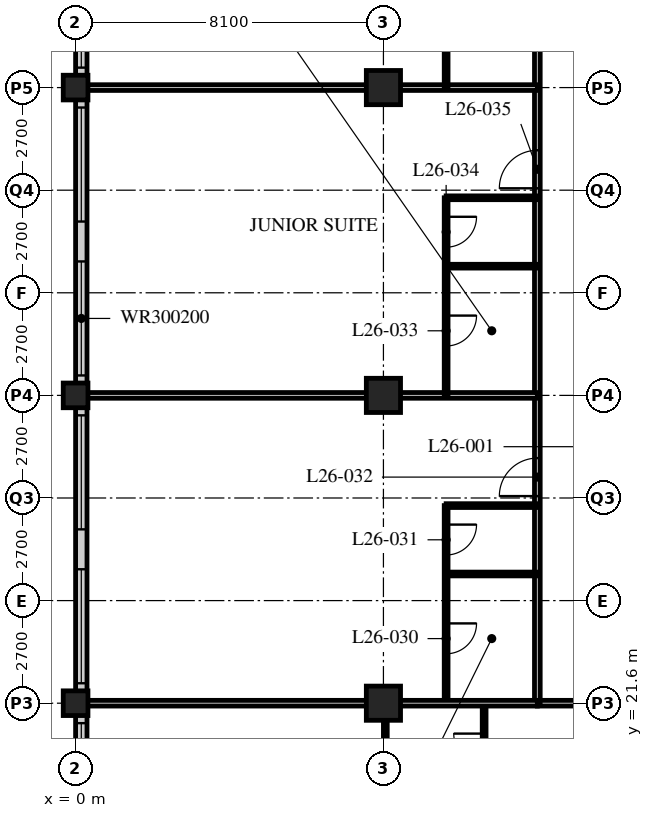
"""IFC4 building model, lengths in metres.
Left out: names, types, materials, properties, quantities, classifications, styles, units other than length and angle.
Written with IfcOpenShell. Run it as: python <this file> out.ifc"""

import sys

from ifc_helpers import new_model, si_unit, direction, frame, frame_2d, origin, origin_2d, place, context, subcontext, project, spatial, rectangle, hollow_rectangle, extrude, element, fill, save


model = new_model("IFC4")
c1 = context("Model", 3, precision=1e-05, world=origin(), true_north=direction((0.0, 1.0)))
c2 = subcontext(c1, "Body", "Model", "MODEL_VIEW")
j1 = project(units=[si_unit("LENGTHUNIT", "METRE"), si_unit("PLANEANGLEUNIT", "RADIAN")], contexts=[c1])
p1 = place(None, origin())
s1 = spatial("IfcSite", under=j1, at=p1, CompositionType="ELEMENT")
p2 = place(p1, origin())
s2 = spatial("IfcBuilding", under=s1, at=p2, CompositionType="ELEMENT")
p3 = place(p2, frame((0.0, 0.0, 106.8)))
s3 = spatial("IfcBuildingStorey", under=s2, at=p3, CompositionType="ELEMENT", Elevation=106.8)
for number, where, z_axis, x_axis in (
    (1, (0.0, 21.6, 0.0), (0.0, 0.0, 1.0), (1.0, 0.0, 0.0)),
    (2, (0.0, 29.7, 0.0), (0.0, 0.0, 1.0), (1.0, 0.0, 0.0)),
    (3, (0.0, 37.8, 0.0), (0.0, 0.0, 1.0), (1.0, 0.0, 0.0)),
):
    element("IfcColumn", number, at=place(p3, frame(where, z_axis=z_axis, x_axis=x_axis)), inside=s3, PredefinedType="COLUMN", context=c2, shape_type="SweptSolid", body=[
        extrude(hollow_rectangle(XDim=0.65, YDim=0.65, WallThickness=0.055, at=origin_2d()), origin(), (0.0, 0.0, 1.0), 3.4),
    ])
for number, where, z_axis, x_axis in (
    (4, (8.1, 21.6, 0.0), (0.0, 0.0, 1.0), (1.0, 0.0, 0.0)),
    (5, (8.1, 29.7, 0.0), (0.0, 0.0, 1.0), (1.0, 0.0, 0.0)),
    (6, (8.1, 37.8, 0.0), (0.0, 0.0, 1.0), (1.0, 0.0, 0.0)),
):
    element("IfcColumn", number, at=place(p3, frame(where, z_axis=z_axis, x_axis=x_axis)), inside=s3, PredefinedType="COLUMN", context=c2, shape_type="SweptSolid", body=[
        extrude(hollow_rectangle(XDim=0.9, YDim=0.9, WallThickness=0.09, at=origin_2d()), origin(), (0.0, 0.0, 1.0), 3.4),
    ])
p4 = place(p3, frame((0.15, 45.6, 0.0), z_axis=(0.0, 0.0, 1.0), x_axis=(0.0, -1.0, 0.0)))
e7 = element("IfcWall", 7, at=p4, inside=s3, PredefinedType="SOLIDWALL", context=c2, shape_type="SweptSolid", body=[
    extrude(rectangle(XDim=32.1, YDim=0.3, at=frame_2d((16.05, 0.0))), origin(), (0.0, 0.0, 1.0), 3.19),
])
p5 = place(p4, frame((0.225, 0.0, 0.9)))
e8 = element("IfcOpeningElement", 8, at=p5, cuts=e7, PredefinedType="OPENING", context=c2, shape_type="SweptSolid", body=[
    extrude(rectangle(XDim=3.0, YDim=2.0, at=frame_2d((1.5, 1.0))), frame((0.0, 0.16, 0.0), z_axis=(0.0, -1.0, 0.0), x_axis=(1.0, 0.0, 0.0)), (0.0, 0.0, 1.0), 0.32),
])
p6 = place(p4, frame((4.275, 0.0, 0.9)))
e9 = element("IfcOpeningElement", 9, at=p6, cuts=e7, PredefinedType="OPENING", context=c2, shape_type="SweptSolid", body=[
    extrude(rectangle(XDim=3.0, YDim=2.0, at=frame_2d((1.5, 1.0))), frame((0.0, 0.16, 0.0), z_axis=(0.0, -1.0, 0.0), x_axis=(1.0, 0.0, 0.0)), (0.0, 0.0, 1.0), 0.32),
])
p7 = place(p4, frame((8.325, 0.0, 0.9)))
e10 = element("IfcOpeningElement", 10, at=p7, cuts=e7, PredefinedType="OPENING", context=c2, shape_type="SweptSolid", body=[
    extrude(rectangle(XDim=3.0, YDim=2.0, at=frame_2d((1.5, 1.0))), frame((0.0, 0.16, 0.0), z_axis=(0.0, -1.0, 0.0), x_axis=(1.0, 0.0, 0.0)), (0.0, 0.0, 1.0), 0.32),
])
p8 = place(p4, frame((12.375, 0.0, 0.9)))
e11 = element("IfcOpeningElement", 11, at=p8, cuts=e7, PredefinedType="OPENING", context=c2, shape_type="SweptSolid", body=[
    extrude(rectangle(XDim=3.0, YDim=2.0, at=frame_2d((1.5, 1.0))), frame((0.0, 0.16, 0.0), z_axis=(0.0, -1.0, 0.0), x_axis=(1.0, 0.0, 0.0)), (0.0, 0.0, 1.0), 0.32),
])
p9 = place(p4, frame((16.425, 0.0, 0.9)))
e12 = element("IfcOpeningElement", 12, at=p9, cuts=e7, PredefinedType="OPENING", context=c2, shape_type="SweptSolid", body=[
    extrude(rectangle(XDim=3.0, YDim=2.0, at=frame_2d((1.5, 1.0))), frame((0.0, 0.16, 0.0), z_axis=(0.0, -1.0, 0.0), x_axis=(1.0, 0.0, 0.0)), (0.0, 0.0, 1.0), 0.32),
])
p10 = place(p4, frame((20.475, 0.0, 0.9)))
e13 = element("IfcOpeningElement", 13, at=p10, cuts=e7, PredefinedType="OPENING", context=c2, shape_type="SweptSolid", body=[
    extrude(rectangle(XDim=3.0, YDim=2.0, at=frame_2d((1.5, 1.0))), frame((0.0, 0.16, 0.0), z_axis=(0.0, -1.0, 0.0), x_axis=(1.0, 0.0, 0.0)), (0.0, 0.0, 1.0), 0.32),
])
p11 = place(p4, frame((24.525, 0.0, 0.9)))
e14 = element("IfcOpeningElement", 14, at=p11, cuts=e7, PredefinedType="OPENING", context=c2, shape_type="SweptSolid", body=[
    extrude(rectangle(XDim=3.0, YDim=2.0, at=frame_2d((1.5, 1.0))), frame((0.0, 0.16, 0.0), z_axis=(0.0, -1.0, 0.0), x_axis=(1.0, 0.0, 0.0)), (0.0, 0.0, 1.0), 0.32),
])
p12 = place(p4, frame((28.575, 0.0, 0.9)))
e15 = element("IfcOpeningElement", 15, at=p12, cuts=e7, PredefinedType="OPENING", context=c2, shape_type="SweptSolid", body=[
    extrude(rectangle(XDim=3.0, YDim=2.0, at=frame_2d((1.5, 1.0))), frame((0.0, 0.16, 0.0), z_axis=(0.0, -1.0, 0.0), x_axis=(1.0, 0.0, 0.0)), (0.0, 0.0, 1.0), 0.32),
])
p13 = place(p3, frame((12.15, 21.6, 0.0), z_axis=(0.0, 0.0, 1.0), x_axis=(1.0, 0.0, 0.0)))
e16 = element("IfcWall", 16, at=p13, inside=s3, PredefinedType="PARTITIONING", context=c2, shape_type="SweptSolid", body=[
    extrude(rectangle(XDim=32.4, YDim=0.15, at=frame_2d((16.2, 0.0))), origin(), (0.0, 0.0, 1.0), 2.578),
])
p14 = place(p13, frame((5.95, 0.0, 0.0)))
e17 = element("IfcOpeningElement", 17, at=p14, cuts=e16, PredefinedType="OPENING", context=c2, shape_type="SweptSolid", body=[
    extrude(rectangle(XDim=1.0, YDim=2.1, at=frame_2d((0.5, 1.05))), frame((0.0, 0.085, 0.0), z_axis=(0.0, -1.0, 0.0), x_axis=(1.0, 0.0, 0.0)), (0.0, 0.0, 1.0), 0.17),
])
p15 = place(p13, frame((14.05, 0.0, 0.0)))
e18 = element("IfcOpeningElement", 18, at=p15, cuts=e16, PredefinedType="OPENING", context=c2, shape_type="SweptSolid", body=[
    extrude(rectangle(XDim=1.0, YDim=2.1, at=frame_2d((0.5, 1.05))), frame((0.0, 0.085, 0.0), z_axis=(0.0, -1.0, 0.0), x_axis=(1.0, 0.0, 0.0)), (0.0, 0.0, 1.0), 0.17),
])
p16 = place(p13, frame((22.15, 0.0, 0.0)))
e19 = element("IfcOpeningElement", 19, at=p16, cuts=e16, PredefinedType="OPENING", context=c2, shape_type="SweptSolid", body=[
    extrude(rectangle(XDim=1.0, YDim=2.1, at=frame_2d((0.5, 1.05))), frame((0.0, 0.085, 0.0), z_axis=(0.0, -1.0, 0.0), x_axis=(1.0, 0.0, 0.0)), (0.0, 0.0, 1.0), 0.17),
])
p17 = place(p13, frame((1.525, 0.0, 0.0)))
e20 = element("IfcOpeningElement", 20, at=p17, cuts=e16, PredefinedType="OPENING", context=c2, shape_type="SweptSolid", body=[
    extrude(rectangle(XDim=1.0, YDim=2.1, at=frame_2d((0.5, 1.05))), frame((0.0, 0.085, 0.0), z_axis=(0.0, -1.0, 0.0), x_axis=(1.0, 0.0, 0.0)), (0.0, 0.0, 1.0), 0.17),
])
p18 = place(p13, frame((29.875, 0.0, 0.0)))
e21 = element("IfcOpeningElement", 21, at=p18, cuts=e16, PredefinedType="OPENING", context=c2, shape_type="SweptSolid", body=[
    extrude(rectangle(XDim=1.0, YDim=2.1, at=frame_2d((0.5, 1.05))), frame((0.0, 0.085, 0.0), z_axis=(0.0, -1.0, 0.0), x_axis=(1.0, 0.0, 0.0)), (0.0, 0.0, 1.0), 0.17),
])
p19 = place(p3, frame((12.15, 21.6, 0.0), z_axis=(0.0, 0.0, 1.0), x_axis=(0.0, 1.0, 0.0)))
e22 = element("IfcWall", 22, at=p19, inside=s3, PredefinedType="PARTITIONING", context=c2, shape_type="SweptSolid", body=[
    extrude(rectangle(XDim=24.3, YDim=0.15, at=frame_2d((12.15, 0.0))), origin(), (0.0, 0.0, 1.0), 3.19),
])
p20 = place(p19, frame((5.45, 0.0, 0.0)))
e23 = element("IfcOpeningElement", 23, at=p20, cuts=e22, PredefinedType="OPENING", context=c2, shape_type="SweptSolid", body=[
    extrude(rectangle(XDim=1.0, YDim=2.1, at=frame_2d((0.5, 1.05))), frame((0.0, 0.085, 0.0), z_axis=(0.0, -1.0, 0.0), x_axis=(1.0, 0.0, 0.0)), (0.0, 0.0, 1.0), 0.17),
])
p21 = place(p19, frame((13.55, 0.0, 0.0)))
e24 = element("IfcOpeningElement", 24, at=p21, cuts=e22, PredefinedType="OPENING", context=c2, shape_type="SweptSolid", body=[
    extrude(rectangle(XDim=1.0, YDim=2.1, at=frame_2d((0.5, 1.05))), frame((0.0, 0.085, 0.0), z_axis=(0.0, -1.0, 0.0), x_axis=(1.0, 0.0, 0.0)), (0.0, 0.0, 1.0), 0.17),
])
p22 = place(p19, frame((21.65, 0.0, 0.0)))
e25 = element("IfcOpeningElement", 25, at=p22, cuts=e22, PredefinedType="OPENING", context=c2, shape_type="SweptSolid", body=[
    extrude(rectangle(XDim=1.0, YDim=2.1, at=frame_2d((0.5, 1.05))), frame((0.0, 0.085, 0.0), z_axis=(0.0, -1.0, 0.0), x_axis=(1.0, 0.0, 0.0)), (0.0, 0.0, 1.0), 0.17),
])
p23 = place(p3, frame((9.75, 21.6, 0.0), z_axis=(0.0, 0.0, 1.0), x_axis=(0.0, 1.0, 0.0)))
e26 = element("IfcWall", 26, at=p23, inside=s3, PredefinedType="PARTITIONING", context=c2, shape_type="SweptSolid", body=[
    extrude(rectangle(XDim=5.2, YDim=0.1, at=frame_2d((2.6, 0.0))), origin(), (0.0, 0.0, 1.0), 3.19),
])
p24 = place(p23, frame((1.3, 0.0, 0.0)))
e27 = element("IfcOpeningElement", 27, at=p24, cuts=e26, PredefinedType="OPENING", context=c2, shape_type="SweptSolid", body=[
    extrude(rectangle(XDim=0.8, YDim=2.1, at=frame_2d((0.4, 1.05))), frame((0.0, 0.06, 0.0), z_axis=(0.0, -1.0, 0.0), x_axis=(1.0, 0.0, 0.0)), (0.0, 0.0, 1.0), 0.12),
])
p25 = place(p23, frame((3.9, 0.0, 0.0)))
e28 = element("IfcOpeningElement", 28, at=p25, cuts=e26, PredefinedType="OPENING", context=c2, shape_type="SweptSolid", body=[
    extrude(rectangle(XDim=0.8, YDim=2.1, at=frame_2d((0.4, 1.05))), frame((0.0, 0.06, 0.0), z_axis=(0.0, -1.0, 0.0), x_axis=(1.0, 0.0, 0.0)), (0.0, 0.0, 1.0), 0.12),
])
for number, where, z_axis, x_axis in (
    (29, (12.15, 25.0, 0.0), (0.0, 0.0, 1.0), (-1.0, 0.0, 0.0)),
    (30, (12.15, 26.8, 0.0), (0.0, 0.0, 1.0), (-1.0, 0.0, 0.0)),
):
    element("IfcWall", number, at=place(p3, frame(where, z_axis=z_axis, x_axis=x_axis)), inside=s3, PredefinedType="PARTITIONING", context=c2, shape_type="SweptSolid", body=[
        extrude(rectangle(XDim=2.4, YDim=0.1, at=frame_2d((1.2, 0.0))), origin(), (0.0, 0.0, 1.0), 3.19),
    ])
p26 = place(p3, frame((12.15, 29.7, 0.0), z_axis=(0.0, 0.0, 1.0), x_axis=(-1.0, 0.0, 0.0)))
e31 = element("IfcWall", 31, at=p26, inside=s3, PredefinedType="PARTITIONING", context=c2, shape_type="SweptSolid", body=[
    extrude(rectangle(XDim=11.85, YDim=0.15, at=frame_2d((5.925, 0.0))), origin(), (0.0, 0.0, 1.0), 2.578),
])
p27 = place(p3, frame((9.75, 29.7, 0.0), z_axis=(0.0, 0.0, 1.0), x_axis=(0.0, 1.0, 0.0)))
e32 = element("IfcWall", 32, at=p27, inside=s3, PredefinedType="PARTITIONING", context=c2, shape_type="SweptSolid", body=[
    extrude(rectangle(XDim=5.2, YDim=0.1, at=frame_2d((2.6, 0.0))), origin(), (0.0, 0.0, 1.0), 3.19),
])
p28 = place(p27, frame((1.3, 0.0, 0.0)))
e33 = element("IfcOpeningElement", 33, at=p28, cuts=e32, PredefinedType="OPENING", context=c2, shape_type="SweptSolid", body=[
    extrude(rectangle(XDim=0.8, YDim=2.1, at=frame_2d((0.4, 1.05))), frame((0.0, 0.06, 0.0), z_axis=(0.0, -1.0, 0.0), x_axis=(1.0, 0.0, 0.0)), (0.0, 0.0, 1.0), 0.12),
])
p29 = place(p27, frame((3.9, 0.0, 0.0)))
e34 = element("IfcOpeningElement", 34, at=p29, cuts=e32, PredefinedType="OPENING", context=c2, shape_type="SweptSolid", body=[
    extrude(rectangle(XDim=0.8, YDim=2.1, at=frame_2d((0.4, 1.05))), frame((0.0, 0.06, 0.0), z_axis=(0.0, -1.0, 0.0), x_axis=(1.0, 0.0, 0.0)), (0.0, 0.0, 1.0), 0.12),
])
for number, where, z_axis, x_axis in (
    (35, (12.15, 33.1, 0.0), (0.0, 0.0, 1.0), (-1.0, 0.0, 0.0)),
    (36, (12.15, 34.9, 0.0), (0.0, 0.0, 1.0), (-1.0, 0.0, 0.0)),
):
    element("IfcWall", number, at=place(p3, frame(where, z_axis=z_axis, x_axis=x_axis)), inside=s3, PredefinedType="PARTITIONING", context=c2, shape_type="SweptSolid", body=[
        extrude(rectangle(XDim=2.4, YDim=0.1, at=frame_2d((1.2, 0.0))), origin(), (0.0, 0.0, 1.0), 3.19),
    ])
p30 = place(p3, frame((12.15, 37.8, 0.0), z_axis=(0.0, 0.0, 1.0), x_axis=(-1.0, 0.0, 0.0)))
e37 = element("IfcWall", 37, at=p30, inside=s3, PredefinedType="PARTITIONING", context=c2, shape_type="SweptSolid", body=[
    extrude(rectangle(XDim=11.85, YDim=0.15, at=frame_2d((5.925, 0.0))), origin(), (0.0, 0.0, 1.0), 2.578),
])
p31 = place(p3, frame((9.75, 37.8, 0.0), z_axis=(0.0, 0.0, 1.0), x_axis=(0.0, 1.0, 0.0)))
e38 = element("IfcWall", 38, at=p31, inside=s3, PredefinedType="PARTITIONING", context=c2, shape_type="SweptSolid", body=[
    extrude(rectangle(XDim=5.2, YDim=0.1, at=frame_2d((2.6, 0.0))), origin(), (0.0, 0.0, 1.0), 3.19),
])
p32 = place(p31, frame((1.3, 0.0, 0.0)))
e39 = element("IfcOpeningElement", 39, at=p32, cuts=e38, PredefinedType="OPENING", context=c2, shape_type="SweptSolid", body=[
    extrude(rectangle(XDim=0.8, YDim=2.1, at=frame_2d((0.4, 1.05))), frame((0.0, 0.06, 0.0), z_axis=(0.0, -1.0, 0.0), x_axis=(1.0, 0.0, 0.0)), (0.0, 0.0, 1.0), 0.12),
])
p33 = place(p31, frame((3.9, 0.0, 0.0)))
e40 = element("IfcOpeningElement", 40, at=p33, cuts=e38, PredefinedType="OPENING", context=c2, shape_type="SweptSolid", body=[
    extrude(rectangle(XDim=0.8, YDim=2.1, at=frame_2d((0.4, 1.05))), frame((0.0, 0.06, 0.0), z_axis=(0.0, -1.0, 0.0), x_axis=(1.0, 0.0, 0.0)), (0.0, 0.0, 1.0), 0.12),
])
p34 = place(p3, frame((10.75, 21.6, 0.0), z_axis=(0.0, 0.0, 1.0), x_axis=(0.0, -1.0, 0.0)))
e41 = element("IfcWall", 41, at=p34, inside=s3, PredefinedType="PARTITIONING", context=c2, shape_type="SweptSolid", body=[
    extrude(rectangle(XDim=2.4, YDim=0.1, at=frame_2d((1.2, 0.0))), origin(), (0.0, 0.0, 1.0), 3.19),
])
p35 = place(p34, frame((0.8, 0.0, 0.0)))
e42 = element("IfcOpeningElement", 42, at=p35, cuts=e41, PredefinedType="OPENING", context=c2, shape_type="SweptSolid", body=[
    extrude(rectangle(XDim=0.8, YDim=2.1, at=frame_2d((0.4, 1.05))), frame((0.0, 0.06, 0.0), z_axis=(0.0, -1.0, 0.0), x_axis=(1.0, 0.0, 0.0)), (0.0, 0.0, 1.0), 0.12),
])
p36 = place(p3, frame((8.15, 21.6, 0.0), z_axis=(0.0, 0.0, 1.0), x_axis=(0.0, -1.0, 0.0)))
e43 = element("IfcWall", 43, at=p36, inside=s3, PredefinedType="PARTITIONING", context=c2, shape_type="SweptSolid", body=[
    extrude(rectangle(XDim=2.4, YDim=0.1, at=frame_2d((1.2, 0.0))), origin(), (0.0, 0.0, 1.0), 2.578),
])
p37 = place(p3, frame((0.3, 21.6, 0.0), z_axis=(0.0, 0.0, 1.0), x_axis=(1.0, 0.0, 0.0)))
e44 = element("IfcWall", 44, at=p37, inside=s3, PredefinedType="PARTITIONING", context=c2, shape_type="SweptSolid", body=[
    extrude(rectangle(XDim=11.85, YDim=0.15, at=frame_2d((5.925, 0.0))), origin(), (0.0, 0.0, 1.0), 2.578),
])
p38 = place(p6, origin())
e45 = element("IfcWindow", 45, at=p38, inside=s3, PartitioningType="SINGLE_PANEL", PredefinedType="WINDOW", context=c2, shape_type="SweptSolid", body=[
    extrude(rectangle(XDim=3.0, YDim=2.0, at=frame_2d((1.5, 1.0))), frame((0.0, 0.03, 0.0), z_axis=(0.0, -1.0, 0.0), x_axis=(1.0, 0.0, 0.0)), (0.0, 0.0, 1.0), 0.06),
])
fill(e9, e45)
p39 = place(p7, origin())
e46 = element("IfcWindow", 46, at=p39, inside=s3, PartitioningType="SINGLE_PANEL", PredefinedType="WINDOW", context=c2, shape_type="SweptSolid", body=[
    extrude(rectangle(XDim=3.0, YDim=2.0, at=frame_2d((1.5, 1.0))), frame((0.0, 0.03, 0.0), z_axis=(0.0, -1.0, 0.0), x_axis=(1.0, 0.0, 0.0)), (0.0, 0.0, 1.0), 0.06),
])
fill(e10, e46)
p40 = place(p8, origin())
e47 = element("IfcWindow", 47, at=p40, inside=s3, PartitioningType="SINGLE_PANEL", PredefinedType="WINDOW", context=c2, shape_type="SweptSolid", body=[
    extrude(rectangle(XDim=3.0, YDim=2.0, at=frame_2d((1.5, 1.0))), frame((0.0, 0.03, 0.0), z_axis=(0.0, -1.0, 0.0), x_axis=(1.0, 0.0, 0.0)), (0.0, 0.0, 1.0), 0.06),
])
fill(e11, e47)
p41 = place(p9, origin())
e48 = element("IfcWindow", 48, at=p41, inside=s3, PartitioningType="SINGLE_PANEL", PredefinedType="WINDOW", context=c2, shape_type="SweptSolid", body=[
    extrude(rectangle(XDim=3.0, YDim=2.0, at=frame_2d((1.5, 1.0))), frame((0.0, 0.03, 0.0), z_axis=(0.0, -1.0, 0.0), x_axis=(1.0, 0.0, 0.0)), (0.0, 0.0, 1.0), 0.06),
])
fill(e12, e48)
p42 = place(p10, origin())
e49 = element("IfcWindow", 49, at=p42, inside=s3, PartitioningType="SINGLE_PANEL", PredefinedType="WINDOW", context=c2, shape_type="SweptSolid", body=[
    extrude(rectangle(XDim=3.0, YDim=2.0, at=frame_2d((1.5, 1.0))), frame((0.0, 0.03, 0.0), z_axis=(0.0, -1.0, 0.0), x_axis=(1.0, 0.0, 0.0)), (0.0, 0.0, 1.0), 0.06),
])
fill(e13, e49)
p43 = place(p11, origin())
e50 = element("IfcWindow", 50, at=p43, inside=s3, PartitioningType="SINGLE_PANEL", PredefinedType="WINDOW", context=c2, shape_type="SweptSolid", body=[
    extrude(rectangle(XDim=3.0, YDim=2.0, at=frame_2d((1.5, 1.0))), frame((0.0, 0.03, 0.0), z_axis=(0.0, -1.0, 0.0), x_axis=(1.0, 0.0, 0.0)), (0.0, 0.0, 1.0), 0.06),
])
fill(e14, e50)
p44 = place(p24, origin())
e51 = element("IfcDoor", 51, at=p44, inside=s3, OperationType="SINGLE_SWING_LEFT", PredefinedType="DOOR", context=c2, shape_type="SweptSolid", body=[
    extrude(rectangle(XDim=0.8, YDim=2.1, at=frame_2d((0.4, 1.05))), frame((0.0, 0.025, 0.0), z_axis=(0.0, -1.0, 0.0), x_axis=(1.0, 0.0, 0.0)), (0.0, 0.0, 1.0), 0.05),
])
fill(e27, e51)
p45 = place(p25, origin())
e52 = element("IfcDoor", 52, at=p45, inside=s3, OperationType="SINGLE_SWING_LEFT", PredefinedType="DOOR", context=c2, shape_type="SweptSolid", body=[
    extrude(rectangle(XDim=0.8, YDim=2.1, at=frame_2d((0.4, 1.05))), frame((0.0, 0.025, 0.0), z_axis=(0.0, -1.0, 0.0), x_axis=(1.0, 0.0, 0.0)), (0.0, 0.0, 1.0), 0.05),
])
fill(e28, e52)
p46 = place(p20, origin())
e53 = element("IfcDoor", 53, at=p46, inside=s3, OperationType="SINGLE_SWING_LEFT", PredefinedType="DOOR", context=c2, shape_type="SweptSolid", body=[
    extrude(rectangle(XDim=1.0, YDim=2.1, at=frame_2d((0.5, 1.05))), frame((0.0, 0.025, 0.0), z_axis=(0.0, -1.0, 0.0), x_axis=(1.0, 0.0, 0.0)), (0.0, 0.0, 1.0), 0.05),
])
fill(e23, e53)
p47 = place(p28, origin())
e54 = element("IfcDoor", 54, at=p47, inside=s3, OperationType="SINGLE_SWING_LEFT", PredefinedType="DOOR", context=c2, shape_type="SweptSolid", body=[
    extrude(rectangle(XDim=0.8, YDim=2.1, at=frame_2d((0.4, 1.05))), frame((0.0, 0.025, 0.0), z_axis=(0.0, -1.0, 0.0), x_axis=(1.0, 0.0, 0.0)), (0.0, 0.0, 1.0), 0.05),
])
fill(e33, e54)
p48 = place(p29, origin())
e55 = element("IfcDoor", 55, at=p48, inside=s3, OperationType="SINGLE_SWING_LEFT", PredefinedType="DOOR", context=c2, shape_type="SweptSolid", body=[
    extrude(rectangle(XDim=0.8, YDim=2.1, at=frame_2d((0.4, 1.05))), frame((0.0, 0.025, 0.0), z_axis=(0.0, -1.0, 0.0), x_axis=(1.0, 0.0, 0.0)), (0.0, 0.0, 1.0), 0.05),
])
fill(e34, e55)
p49 = place(p21, origin())
e56 = element("IfcDoor", 56, at=p49, inside=s3, OperationType="SINGLE_SWING_LEFT", PredefinedType="DOOR", context=c2, shape_type="SweptSolid", body=[
    extrude(rectangle(XDim=1.0, YDim=2.1, at=frame_2d((0.5, 1.05))), frame((0.0, 0.025, 0.0), z_axis=(0.0, -1.0, 0.0), x_axis=(1.0, 0.0, 0.0)), (0.0, 0.0, 1.0), 0.05),
])
fill(e24, e56)
p50 = place(p35, origin())
e57 = element("IfcDoor", 57, at=p50, inside=s3, OperationType="SINGLE_SWING_RIGHT", PredefinedType="DOOR", context=c2, shape_type="SweptSolid", body=[
    extrude(rectangle(XDim=0.8, YDim=2.1, at=frame_2d((0.4, 1.05))), frame((0.0, 0.025, 0.0), z_axis=(0.0, -1.0, 0.0), x_axis=(1.0, 0.0, 0.0)), (0.0, 0.0, 1.0), 0.05),
])
fill(e42, e57)
save(model, sys.argv[1])
